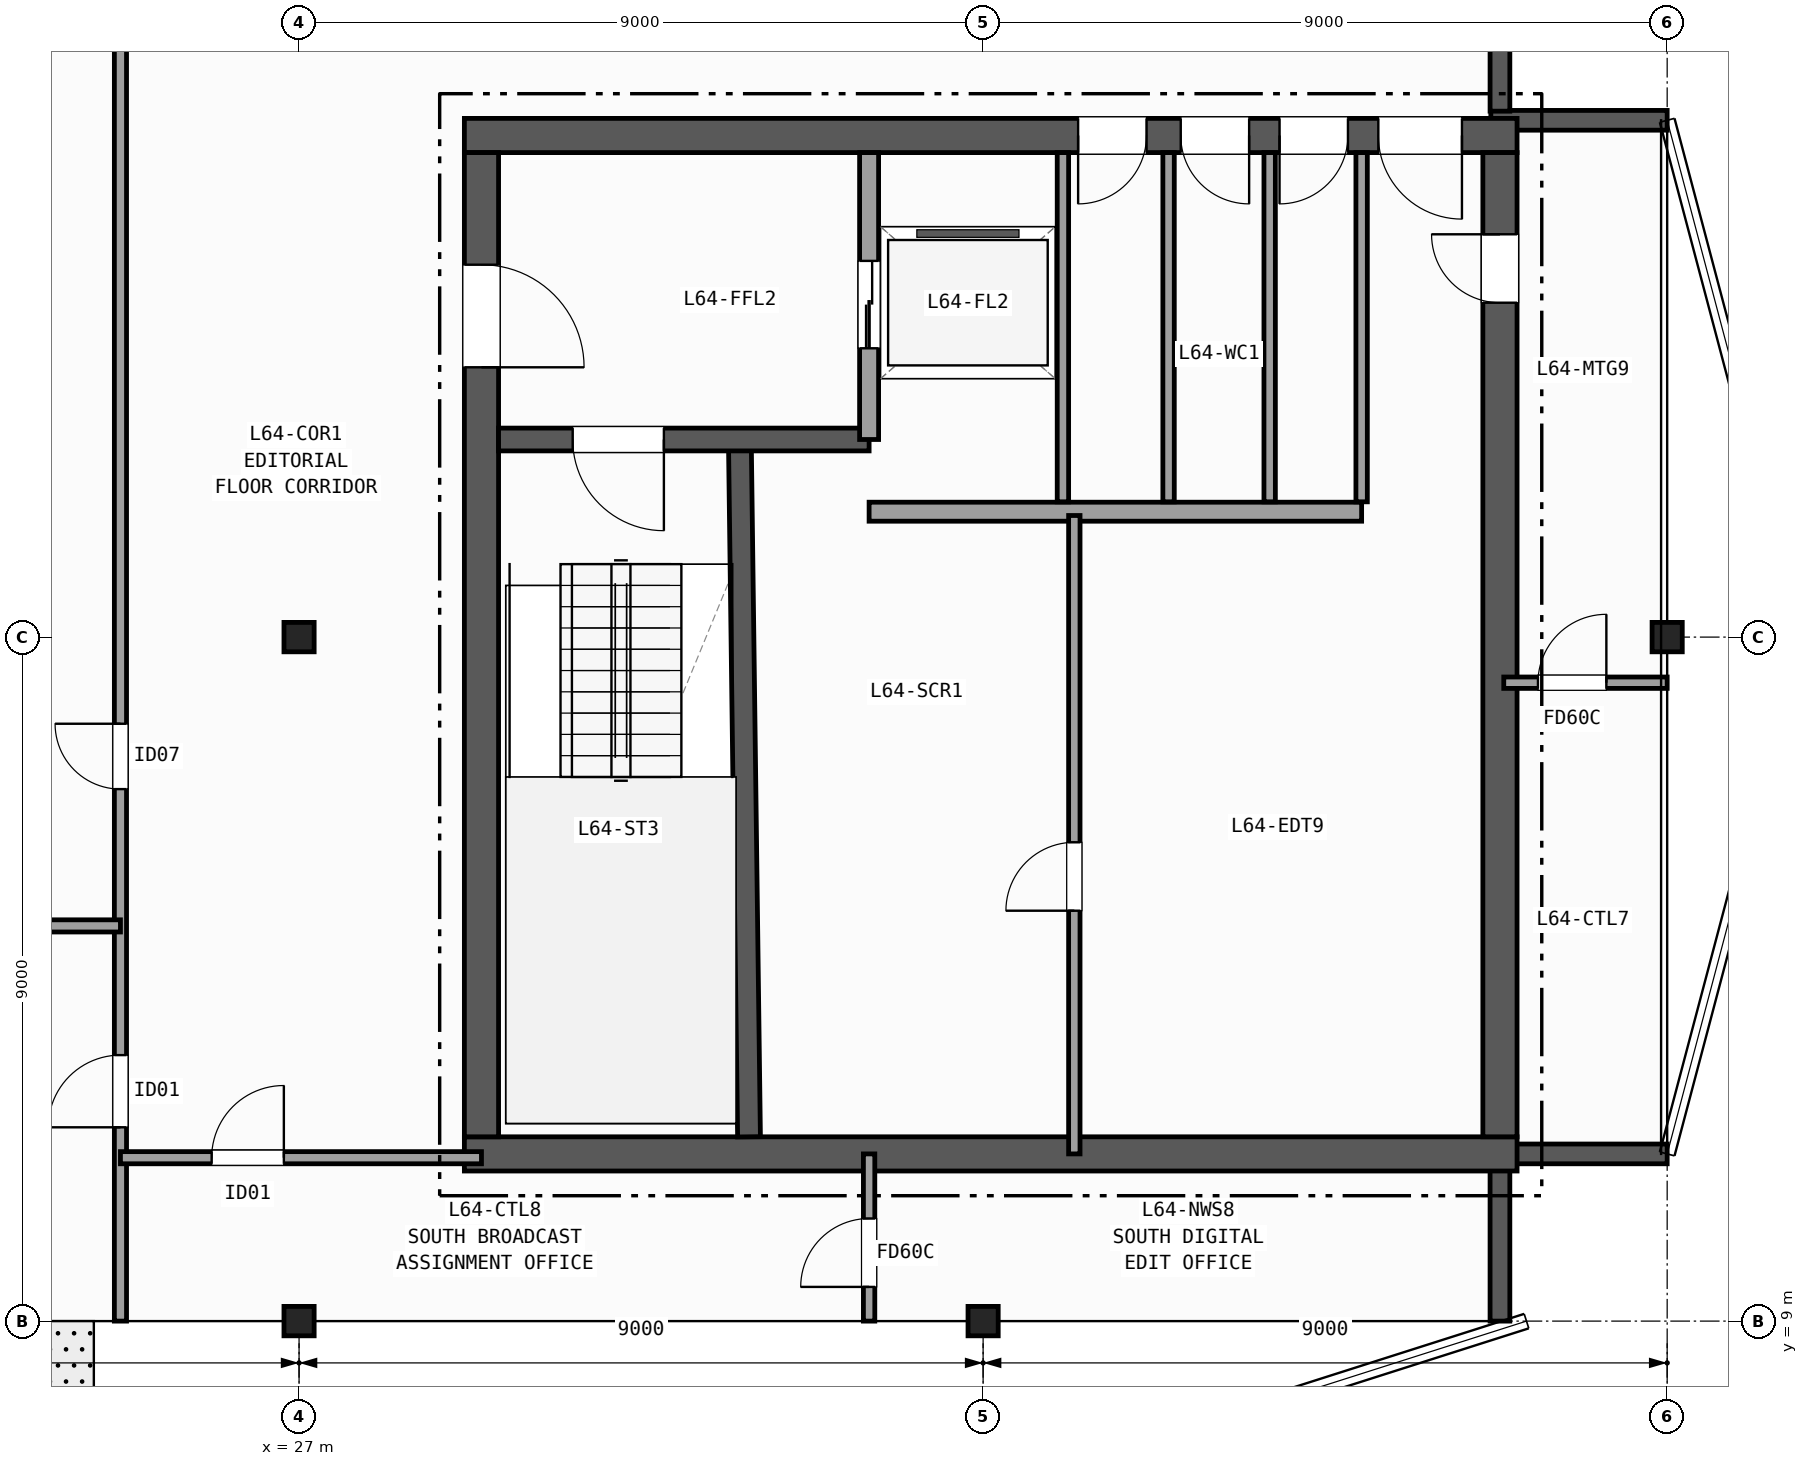
"""IFC4 building model, lengths in metres.
Left out: names, types, materials, properties, quantities, classifications, styles, units other than length and angle.
Written with IfcOpenShell. Run it as: python <this file> out.ifc"""

import sys

from ifc_helpers import new_model, si_unit, direction, frame, frame_2d, origin, origin_2d, place, context, subcontext, project, spatial, rectangle, i_section, extrude, element, fill, save


model = new_model("IFC4")
c1 = context("Model", 3, precision=1e-05, world=origin(), true_north=direction((0.0, 1.0)))
c2 = subcontext(c1, "Body", "Model", "MODEL_VIEW")
j1 = project(units=[si_unit("LENGTHUNIT", "METRE"), si_unit("PLANEANGLEUNIT", "RADIAN")], contexts=[c1])
p1 = place(None, origin())
s1 = spatial("IfcSite", under=j1, at=p1, CompositionType="ELEMENT")
p2 = place(p1, origin())
s2 = spatial("IfcBuilding", under=s1, at=p2, CompositionType="ELEMENT")
p3 = place(p2, frame((0.0, 0.0, 255.6)))
s3 = spatial("IfcBuildingStorey", under=s2, at=p3, CompositionType="ELEMENT", Elevation=255.6)
for number, where, z_axis, x_axis in (
    (1, (27.0, 9.0, 0.0), (0.0, 0.0, 1.0), (1.0, 0.0, 0.0)),
    (2, (27.0, 18.0, 0.0), (0.0, 0.0, 1.0), (1.0, 0.0, 0.0)),
    (3, (36.0, 9.0, 0.0), (0.0, 0.0, 1.0), (1.0, 0.0, 0.0)),
    (4, (45.0, 18.0, 0.0), (0.0, 0.0, 1.0), (1.0, 0.0, 0.0)),
):
    element("IfcColumn", number, at=place(p3, frame(where, z_axis=z_axis, x_axis=x_axis)), inside=s3, PredefinedType="COLUMN", context=c2, shape_type="SweptSolid", body=[
        extrude(i_section(OverallWidth=0.397, OverallDepth=0.387, WebThickness=0.021, FlangeThickness=0.033, FilletRadius=0.015, at=origin_2d()), origin(), (0.0, 0.0, 1.0), 3.7),
    ])
p4 = place(p3, frame((42.8, 9.0, 0.0), z_axis=(0.0, 0.0, 1.0), x_axis=(0.0, 1.0, 0.0)))
e5 = element("IfcWall", 5, at=p4, inside=s3, PredefinedType="SOLIDWALL", context=c2, shape_type="SweptSolid", body=[
    extrude(rectangle(XDim=2.08, YDim=0.26, at=frame_2d((1.04, 0.0))), origin(), (0.0, 0.0, 1.0), 3.42),
])
for number, where, z_axis, x_axis in (
    (6, (42.68, 11.2, 0.0), (0.0, 0.0, 1.0), (1.0, 0.0, 0.0)),
    (7, (45.0, 24.8, 0.0), (0.0, 0.0, 1.0), (-1.0, 0.0, 0.0)),
):
    element("IfcWall", number, at=place(p3, frame(where, z_axis=z_axis, x_axis=x_axis)), inside=s3, PredefinedType="SOLIDWALL", context=c2, shape_type="SweptSolid", body=[
        extrude(rectangle(XDim=2.32, YDim=0.26, at=frame_2d((1.16, 0.0))), origin(), (0.0, 0.0, 1.0), 3.42),
    ])
p5 = place(p3, frame((42.8, 24.92, 0.0), z_axis=(0.0, 0.0, 1.0), x_axis=(0.0, 1.0, 0.0)))
e8 = element("IfcWall", 8, at=p5, inside=s3, PredefinedType="SOLIDWALL", context=c2, shape_type="SweptSolid", body=[
    extrude(rectangle(XDim=2.08, YDim=0.26, at=frame_2d((1.04, 0.0))), origin(), (0.0, 0.0, 1.0), 3.42),
])
p6 = place(p3, frame((29.175, 11.2, 0.0), z_axis=(0.0, 0.0, 1.0), x_axis=(1.0, 0.0, 0.0)))
e9 = element("IfcWall", 9, at=p6, inside=s3, PredefinedType="SHEAR", context=c2, shape_type="SweptSolid", body=[
    extrude(rectangle(XDim=13.85, YDim=0.45, at=frame_2d((6.925, 0.0))), origin(), (0.0, 0.0, 1.0), 3.42),
])
p7 = place(p3, frame((43.025, 24.6, 0.0), z_axis=(0.0, 0.0, 1.0), x_axis=(-1.0, 0.0, 0.0)))
e10 = element("IfcWall", 10, at=p7, inside=s3, PredefinedType="SHEAR", context=c2, shape_type="SweptSolid", body=[
    extrude(rectangle(XDim=13.85, YDim=0.45, at=frame_2d((6.925, 0.0))), origin(), (0.0, 0.0, 1.0), 3.42),
])
p8 = place(p7, frame((0.725, 0.0, 0.0)))
e11 = element("IfcOpeningElement", 11, at=p8, cuts=e10, PredefinedType="OPENING", context=c2, shape_type="SweptSolid", body=[
    extrude(rectangle(XDim=1.1, YDim=2.15, at=frame_2d((0.55, 1.075))), frame((0.0, 0.235, 0.0), z_axis=(0.0, -1.0, 0.0), x_axis=(1.0, 0.0, 0.0)), (0.0, 0.0, 1.0), 0.47),
])
p9 = place(p7, frame((2.225, 0.0, 0.0)))
e12 = element("IfcOpeningElement", 12, at=p9, cuts=e10, PredefinedType="OPENING", context=c2, shape_type="SweptSolid", body=[
    extrude(rectangle(XDim=0.9, YDim=2.1, at=frame_2d((0.45, 1.05))), frame((0.0, 0.235, 0.0), z_axis=(0.0, -1.0, 0.0), x_axis=(1.0, 0.0, 0.0)), (0.0, 0.0, 1.0), 0.47),
])
p10 = place(p7, frame((3.525, 0.0, 0.0)))
e13 = element("IfcOpeningElement", 13, at=p10, cuts=e10, PredefinedType="OPENING", context=c2, shape_type="SweptSolid", body=[
    extrude(rectangle(XDim=0.9, YDim=2.1, at=frame_2d((0.45, 1.05))), frame((0.0, 0.235, 0.0), z_axis=(0.0, -1.0, 0.0), x_axis=(1.0, 0.0, 0.0)), (0.0, 0.0, 1.0), 0.47),
])
p11 = place(p7, frame((4.875, 0.0, 0.0)))
e14 = element("IfcOpeningElement", 14, at=p11, cuts=e10, PredefinedType="OPENING", context=c2, shape_type="SweptSolid", body=[
    extrude(rectangle(XDim=0.9, YDim=2.1, at=frame_2d((0.45, 1.05))), frame((0.0, 0.235, 0.0), z_axis=(0.0, -1.0, 0.0), x_axis=(1.0, 0.0, 0.0)), (0.0, 0.0, 1.0), 0.47),
])
p12 = place(p3, frame((29.4, 24.375, 0.0), z_axis=(0.0, 0.0, 1.0), x_axis=(0.0, -1.0, 0.0)))
e15 = element("IfcWall", 15, at=p12, inside=s3, PredefinedType="SHEAR", context=c2, shape_type="SweptSolid", body=[
    extrude(rectangle(XDim=12.95, YDim=0.45, at=frame_2d((6.475, 0.0))), origin(), (0.0, 0.0, 1.0), 3.42),
])
p13 = place(p12, frame((1.475, 0.0, 0.0)))
e16 = element("IfcOpeningElement", 16, at=p13, cuts=e15, PredefinedType="OPENING", context=c2, shape_type="SweptSolid", body=[
    extrude(rectangle(XDim=1.35, YDim=2.15, at=frame_2d((0.675, 1.075))), frame((0.0, 0.235, 0.0), z_axis=(0.0, -1.0, 0.0), x_axis=(1.0, 0.0, 0.0)), (0.0, 0.0, 1.0), 0.47),
])
p14 = place(p3, frame((42.8, 11.425, 0.0), z_axis=(0.0, 0.0, 1.0), x_axis=(0.0, 1.0, 0.0)))
e17 = element("IfcWall", 17, at=p14, inside=s3, PredefinedType="SHEAR", context=c2, shape_type="SweptSolid", body=[
    extrude(rectangle(XDim=12.95, YDim=0.45, at=frame_2d((6.475, 0.0))), origin(), (0.0, 0.0, 1.0), 3.42),
])
p15 = place(p14, frame((10.975, 0.0, 0.0)))
e18 = element("IfcOpeningElement", 18, at=p15, cuts=e17, PredefinedType="OPENING", context=c2, shape_type="SweptSolid", body=[
    extrude(rectangle(XDim=0.9, YDim=2.1, at=frame_2d((0.45, 1.05))), frame((0.0, 0.235, 0.0), z_axis=(0.0, -1.0, 0.0), x_axis=(1.0, 0.0, 0.0)), (0.0, 0.0, 1.0), 0.47),
])
p16 = place(p3, frame((32.92, 11.425, 0.0), z_axis=(0.0, 0.0, 1.0), x_axis=(-0.013135638869, 0.999913723774, 0.0)))
e19 = element("IfcWall", 19, at=p16, inside=s3, PredefinedType="SHEAR", context=c2, shape_type="SweptSolid", body=[
    extrude(rectangle(XDim=9.126, YDim=0.3, at=frame_2d((4.563, 0.0))), origin(), (0.0, 0.0, 1.0), 3.42),
])
p17 = place(p3, frame((34.5, 20.6, 0.0), z_axis=(0.0, 0.0, 1.0), x_axis=(-1.0, 0.0, 0.0)))
e20 = element("IfcWall", 20, at=p17, inside=s3, PredefinedType="SHEAR", context=c2, shape_type="SweptSolid", body=[
    extrude(rectangle(XDim=4.875, YDim=0.3, at=frame_2d((2.438, 0.0))), origin(), (0.0, 0.0, 1.0), 3.42),
])
p18 = place(p17, frame((2.7, 0.0, 0.0)))
e21 = element("IfcOpeningElement", 21, at=p18, cuts=e20, PredefinedType="OPENING", context=c2, shape_type="SweptSolid", body=[
    extrude(rectangle(XDim=1.2, YDim=2.15, at=frame_2d((0.6, 1.075))), frame((0.0, 0.16, 0.0), z_axis=(0.0, -1.0, 0.0), x_axis=(1.0, 0.0, 0.0)), (0.0, 0.0, 1.0), 0.32),
])
p19 = place(p3, frame((34.5, 20.6, 0.0), z_axis=(0.0, 0.0, 1.0), x_axis=(0.0, 1.0, 0.0)))
e22 = element("IfcWall", 22, at=p19, inside=s3, PredefinedType="PARTITIONING", context=c2, shape_type="SweptSolid", body=[
    extrude(rectangle(XDim=3.775, YDim=0.25, at=frame_2d((1.887, 0.0))), origin(), (0.0, 0.0, 1.0), 3.42),
])
p20 = place(p19, frame((1.2, 0.0, 0.0)))
e23 = element("IfcOpeningElement", 23, at=p20, cuts=e22, PredefinedType="OPENING", context=c2, shape_type="SweptSolid", body=[
    extrude(rectangle(XDim=1.15, YDim=2.15, at=frame_2d((0.575, 1.075))), frame((0.0, 0.135, 0.0), z_axis=(0.0, -1.0, 0.0), x_axis=(1.0, 0.0, 0.0)), (0.0, 0.0, 1.0), 0.27),
])
p21 = place(p3, frame((34.5, 19.65, 0.0), z_axis=(0.0, 0.0, 1.0), x_axis=(1.0, 0.0, 0.0)))
e24 = element("IfcWall", 24, at=p21, inside=s3, PredefinedType="PARTITIONING", context=c2, shape_type="SweptSolid", body=[
    extrude(rectangle(XDim=6.48, YDim=0.25, at=frame_2d((3.24, 0.0))), origin(), (0.0, 0.0, 1.0), 3.42),
])
p22 = place(p3, frame((37.2, 11.2, 0.0), z_axis=(0.0, 0.0, 1.0), x_axis=(0.0, 1.0, 0.0)))
e25 = element("IfcWall", 25, at=p22, inside=s3, PredefinedType="PARTITIONING", context=c2, shape_type="SweptSolid", body=[
    extrude(rectangle(XDim=8.4, YDim=0.15, at=frame_2d((4.2, 0.0))), origin(), (0.0, 0.0, 1.0), 3.42),
])
p23 = place(p22, frame((3.2, 0.0, 0.0)))
e26 = element("IfcOpeningElement", 26, at=p23, cuts=e25, PredefinedType="OPENING", context=c2, shape_type="SweptSolid", body=[
    extrude(rectangle(XDim=0.9, YDim=2.1, at=frame_2d((0.45, 1.05))), frame((0.0, 0.085, 0.0), z_axis=(0.0, -1.0, 0.0), x_axis=(1.0, 0.0, 0.0)), (0.0, 0.0, 1.0), 0.17),
])
for number, where, z_axis, x_axis in (
    (27, (37.05, 19.78, 0.0), (0.0, 0.0, 1.0), (0.0, 1.0, 0.0)),
    (28, (38.44, 19.78, 0.0), (0.0, 0.0, 1.0), (0.0, 1.0, 0.0)),
    (29, (39.77, 19.78, 0.0), (0.0, 0.0, 1.0), (0.0, 1.0, 0.0)),
    (30, (40.98, 19.78, 0.0), (0.0, 0.0, 1.0), (0.0, 1.0, 0.0)),
):
    element("IfcWall", number, at=place(p3, frame(where, z_axis=z_axis, x_axis=x_axis)), inside=s3, PredefinedType="PARTITIONING", context=c2, shape_type="SweptSolid", body=[
        extrude(rectangle(XDim=4.595, YDim=0.15, at=frame_2d((2.297, 0.0))), origin(), (0.0, 0.0, 1.0), 3.42),
    ])
p24 = place(p3, frame((24.65, 9.0, 0.0), z_axis=(0.0, 0.0, 1.0), x_axis=(0.0, 1.0, 0.0)))
e31 = element("IfcWall", 31, at=p24, inside=s3, PredefinedType="PARTITIONING", context=c2, shape_type="SweptSolid", body=[
    extrude(rectangle(XDim=19.2, YDim=0.16, at=frame_2d((9.6, 0.0))), origin(), (0.0, 0.0, 1.0), 2.707),
])
p25 = place(p24, frame((7.0, 0.0, 0.0)))
e32 = element("IfcOpeningElement", 32, at=p25, cuts=e31, PredefinedType="OPENING", context=c2, shape_type="SweptSolid", body=[
    extrude(rectangle(XDim=0.86, YDim=2.05, at=frame_2d((0.43, 1.025))), frame((0.0, 0.09, 0.0), z_axis=(0.0, -1.0, 0.0), x_axis=(1.0, 0.0, 0.0)), (0.0, 0.0, 1.0), 0.18),
])
p26 = place(p24, frame((2.55, 0.0, 0.0)))
e33 = element("IfcOpeningElement", 33, at=p26, cuts=e31, PredefinedType="OPENING", context=c2, shape_type="SweptSolid", body=[
    extrude(rectangle(XDim=0.95, YDim=2.1, at=frame_2d((0.475, 1.05))), frame((0.0, 0.09, 0.0), z_axis=(0.0, -1.0, 0.0), x_axis=(1.0, 0.0, 0.0)), (0.0, 0.0, 1.0), 0.18),
])
p27 = place(p3, frame((18.0, 14.2, 0.0), z_axis=(0.0, 0.0, 1.0), x_axis=(1.0, 0.0, 0.0)))
e34 = element("IfcWall", 34, at=p27, inside=s3, PredefinedType="PARTITIONING", context=c2, shape_type="SweptSolid", body=[
    extrude(rectangle(XDim=6.65, YDim=0.16, at=frame_2d((3.325, 0.0))), origin(), (0.0, 0.0, 1.0), 2.792),
])
p28 = place(p3, frame((24.65, 11.15, 0.0), z_axis=(0.0, 0.0, 1.0), x_axis=(1.0, 0.0, 0.0)))
e35 = element("IfcWall", 35, at=p28, inside=s3, PredefinedType="PARTITIONING", context=c2, shape_type="SweptSolid", body=[
    extrude(rectangle(XDim=4.75, YDim=0.16, at=frame_2d((2.375, 0.0))), origin(), (0.0, 0.0, 1.0), 2.792),
])
p29 = place(p28, frame((1.2, 0.0, 0.0)))
e36 = element("IfcOpeningElement", 36, at=p29, cuts=e35, PredefinedType="OPENING", context=c2, shape_type="SweptSolid", body=[
    extrude(rectangle(XDim=0.95, YDim=2.1, at=frame_2d((0.475, 1.05))), frame((0.0, 0.09, 0.0), z_axis=(0.0, -1.0, 0.0), x_axis=(1.0, 0.0, 0.0)), (0.0, 0.0, 1.0), 0.18),
])
p30 = place(p3, frame((34.5, 9.0, 0.0), z_axis=(0.0, 0.0, 1.0), x_axis=(0.0, 1.0, 0.0)))
e37 = element("IfcWall", 37, at=p30, inside=s3, PredefinedType="PARTITIONING", context=c2, shape_type="SweptSolid", body=[
    extrude(rectangle(XDim=2.2, YDim=0.15, at=frame_2d((1.1, 0.0))), origin(), (0.0, 0.0, 1.0), 2.707),
])
p31 = place(p30, frame((0.45, 0.0, 0.0)))
e38 = element("IfcOpeningElement", 38, at=p31, cuts=e37, PredefinedType="OPENING", context=c2, shape_type="SweptSolid", body=[
    extrude(rectangle(XDim=0.9, YDim=2.1, at=frame_2d((0.45, 1.05))), frame((0.0, 0.085, 0.0), z_axis=(0.0, -1.0, 0.0), x_axis=(1.0, 0.0, 0.0)), (0.0, 0.0, 1.0), 0.17),
])
p32 = place(p3, frame((42.85, 17.4, 0.0), z_axis=(0.0, 0.0, 1.0), x_axis=(1.0, 0.0, 0.0)))
e39 = element("IfcWall", 39, at=p32, inside=s3, PredefinedType="PARTITIONING", context=c2, shape_type="SweptSolid", body=[
    extrude(rectangle(XDim=2.15, YDim=0.15, at=frame_2d((1.075, 0.0))), origin(), (0.0, 0.0, 1.0), 3.42),
])
p33 = place(p32, frame((0.45, 0.0, 0.0)))
e40 = element("IfcOpeningElement", 40, at=p33, cuts=e39, PredefinedType="OPENING", context=c2, shape_type="SweptSolid", body=[
    extrude(rectangle(XDim=0.9, YDim=2.1, at=frame_2d((0.45, 1.05))), frame((0.0, 0.085, 0.0), z_axis=(0.0, -1.0, 0.0), x_axis=(1.0, 0.0, 0.0)), (0.0, 0.0, 1.0), 0.17),
])
p34 = place(p18, origin())
e41 = element("IfcDoor", 41, at=p34, inside=s3, OperationType="SINGLE_SWING_LEFT", PredefinedType="DOOR", context=c2, shape_type="SweptSolid", body=[
    extrude(rectangle(XDim=1.2, YDim=2.15, at=frame_2d((0.6, 1.075))), frame((0.0, 0.025, 0.0), z_axis=(0.0, -1.0, 0.0), x_axis=(1.0, 0.0, 0.0)), (0.0, 0.0, 1.0), 0.05),
])
fill(e21, e41)
p35 = place(p13, origin())
e42 = element("IfcDoor", 42, at=p35, inside=s3, OperationType="SINGLE_SWING_RIGHT", PredefinedType="DOOR", context=c2, shape_type="SweptSolid", body=[
    extrude(rectangle(XDim=1.35, YDim=2.15, at=frame_2d((0.675, 1.075))), frame((0.0, 0.025, 0.0), z_axis=(0.0, -1.0, 0.0), x_axis=(1.0, 0.0, 0.0)), (0.0, 0.0, 1.0), 0.05),
])
fill(e16, e42)
p36 = place(p15, origin())
e43 = element("IfcDoor", 43, at=p36, inside=s3, OperationType="SINGLE_SWING_RIGHT", PredefinedType="DOOR", context=c2, shape_type="SweptSolid", body=[
    extrude(rectangle(XDim=0.9, YDim=2.1, at=frame_2d((0.45, 1.05))), frame((0.0, 0.025, 0.0), z_axis=(0.0, -1.0, 0.0), x_axis=(1.0, 0.0, 0.0)), (0.0, 0.0, 1.0), 0.05),
])
fill(e18, e43)
p37 = place(p8, origin())
e44 = element("IfcDoor", 44, at=p37, inside=s3, OperationType="SINGLE_SWING_LEFT", PredefinedType="DOOR", context=c2, shape_type="SweptSolid", body=[
    extrude(rectangle(XDim=1.1, YDim=2.15, at=frame_2d((0.55, 1.075))), frame((0.0, 0.025, 0.0), z_axis=(0.0, -1.0, 0.0), x_axis=(1.0, 0.0, 0.0)), (0.0, 0.0, 1.0), 0.05),
])
fill(e11, e44)
p38 = place(p9, origin())
e45 = element("IfcDoor", 45, at=p38, inside=s3, OperationType="SINGLE_SWING_RIGHT", PredefinedType="DOOR", context=c2, shape_type="SweptSolid", body=[
    extrude(rectangle(XDim=0.9, YDim=2.1, at=frame_2d((0.45, 1.05))), frame((0.0, 0.025, 0.0), z_axis=(0.0, -1.0, 0.0), x_axis=(1.0, 0.0, 0.0)), (0.0, 0.0, 1.0), 0.05),
])
fill(e12, e45)
p39 = place(p10, origin())
e46 = element("IfcDoor", 46, at=p39, inside=s3, OperationType="SINGLE_SWING_LEFT", PredefinedType="DOOR", context=c2, shape_type="SweptSolid", body=[
    extrude(rectangle(XDim=0.9, YDim=2.1, at=frame_2d((0.45, 1.05))), frame((0.0, 0.025, 0.0), z_axis=(0.0, -1.0, 0.0), x_axis=(1.0, 0.0, 0.0)), (0.0, 0.0, 1.0), 0.05),
])
fill(e13, e46)
p40 = place(p11, origin())
e47 = element("IfcDoor", 47, at=p40, inside=s3, OperationType="SINGLE_SWING_RIGHT", PredefinedType="DOOR", context=c2, shape_type="SweptSolid", body=[
    extrude(rectangle(XDim=0.9, YDim=2.1, at=frame_2d((0.45, 1.05))), frame((0.0, 0.025, 0.0), z_axis=(0.0, -1.0, 0.0), x_axis=(1.0, 0.0, 0.0)), (0.0, 0.0, 1.0), 0.05),
])
fill(e14, e47)
p41 = place(p20, origin())
e48 = element("IfcDoor", 48, at=p41, inside=s3, OperationType="DOUBLE_DOOR_SLIDING", PredefinedType="DOOR", context=c2, shape_type="SweptSolid", body=[
    extrude(rectangle(XDim=1.15, YDim=2.15, at=frame_2d((0.575, 1.075))), frame((0.0, 0.025, 0.0), z_axis=(0.0, -1.0, 0.0), x_axis=(1.0, 0.0, 0.0)), (0.0, 0.0, 1.0), 0.05),
])
fill(e23, e48)
p42 = place(p23, origin())
e49 = element("IfcDoor", 49, at=p42, inside=s3, OperationType="SINGLE_SWING_LEFT", PredefinedType="DOOR", context=c2, shape_type="SweptSolid", body=[
    extrude(rectangle(XDim=0.9, YDim=2.1, at=frame_2d((0.45, 1.05))), frame((0.0, 0.025, 0.0), z_axis=(0.0, -1.0, 0.0), x_axis=(1.0, 0.0, 0.0)), (0.0, 0.0, 1.0), 0.05),
])
fill(e26, e49)
p43 = place(p25, origin())
e50 = element("IfcDoor", 50, at=p43, inside=s3, OperationType="SINGLE_SWING_RIGHT", PredefinedType="DOOR", context=c2, shape_type="SweptSolid", body=[
    extrude(rectangle(XDim=0.86, YDim=2.05, at=frame_2d((0.43, 1.025))), frame((0.0, 0.025, 0.0), z_axis=(0.0, -1.0, 0.0), x_axis=(1.0, 0.0, 0.0)), (0.0, 0.0, 1.0), 0.05),
])
fill(e32, e50)
p44 = place(p26, origin())
e51 = element("IfcDoor", 51, at=p44, inside=s3, OperationType="SINGLE_SWING_LEFT", PredefinedType="DOOR", context=c2, shape_type="SweptSolid", body=[
    extrude(rectangle(XDim=0.95, YDim=2.1, at=frame_2d((0.475, 1.05))), frame((0.0, 0.025, 0.0), z_axis=(0.0, -1.0, 0.0), x_axis=(1.0, 0.0, 0.0)), (0.0, 0.0, 1.0), 0.05),
])
fill(e33, e51)
p45 = place(p29, origin())
e52 = element("IfcDoor", 52, at=p45, inside=s3, OperationType="SINGLE_SWING_RIGHT", PredefinedType="DOOR", context=c2, shape_type="SweptSolid", body=[
    extrude(rectangle(XDim=0.95, YDim=2.1, at=frame_2d((0.475, 1.05))), frame((0.0, 0.025, 0.0), z_axis=(0.0, -1.0, 0.0), x_axis=(1.0, 0.0, 0.0)), (0.0, 0.0, 1.0), 0.05),
])
fill(e36, e52)
p46 = place(p31, origin())
e53 = element("IfcDoor", 53, at=p46, inside=s3, OperationType="SINGLE_SWING_LEFT", PredefinedType="DOOR", context=c2, shape_type="SweptSolid", body=[
    extrude(rectangle(XDim=0.9, YDim=2.1, at=frame_2d((0.45, 1.05))), frame((0.0, 0.025, 0.0), z_axis=(0.0, -1.0, 0.0), x_axis=(1.0, 0.0, 0.0)), (0.0, 0.0, 1.0), 0.05),
])
fill(e38, e53)
p47 = place(p33, origin())
e54 = element("IfcDoor", 54, at=p47, inside=s3, OperationType="SINGLE_SWING_RIGHT", PredefinedType="DOOR", context=c2, shape_type="SweptSolid", body=[
    extrude(rectangle(XDim=0.9, YDim=2.1, at=frame_2d((0.45, 1.05))), frame((0.0, 0.025, 0.0), z_axis=(0.0, -1.0, 0.0), x_axis=(1.0, 0.0, 0.0)), (0.0, 0.0, 1.0), 0.05),
])
fill(e40, e54)
save(model, sys.argv[1])
